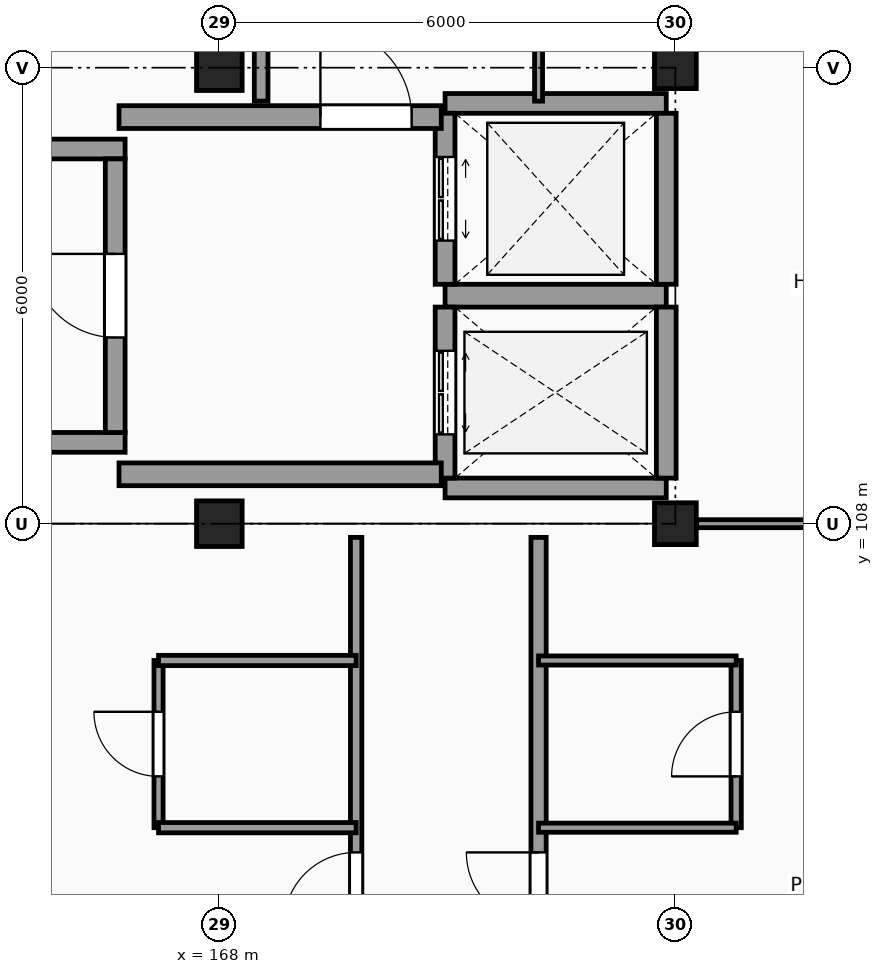
"""IFC4 building model, lengths in metres.
Left out: names, types, materials, properties, quantities, classifications, styles, units other than length and angle.
Written with IfcOpenShell. Run it as: python <this file> out.ifc"""

import sys

from ifc_helpers import new_model, si_unit, direction, frame, frame_2d, origin, origin_2d, place, context, subcontext, project, spatial, rectangle, extrude, element, fill, save


model = new_model("IFC4")
c1 = context("Model", 3, precision=1e-05, world=origin(), true_north=direction((0.0, 1.0)))
c2 = subcontext(c1, "Body", "Model", "MODEL_VIEW")
j1 = project(units=[si_unit("LENGTHUNIT", "METRE"), si_unit("PLANEANGLEUNIT", "RADIAN")], contexts=[c1])
p1 = place(None, origin())
s1 = spatial("IfcSite", under=j1, at=p1, CompositionType="ELEMENT")
p2 = place(p1, origin())
s2 = spatial("IfcBuilding", under=s1, at=p2, CompositionType="ELEMENT")
p3 = place(p2, frame((0.0, 0.0, 31.5)))
s3 = spatial("IfcBuildingStorey", under=s2, at=p3, CompositionType="ELEMENT", Elevation=31.5)
for number, where, z_axis, x_axis in (
    (1, (168.0, 108.0, 0.0), (0.0, 0.0, 1.0), (1.0, 0.0, 0.0)),
    (2, (168.0, 114.0, 0.0), (0.0, 0.0, 1.0), (1.0, 0.0, 0.0)),
):
    element("IfcColumn", number, at=place(p3, frame(where, z_axis=z_axis, x_axis=x_axis)), inside=s3, PredefinedType="COLUMN", context=c2, shape_type="SweptSolid", body=[
        extrude(rectangle(XDim=0.6, YDim=0.6, at=origin_2d()), origin(), (0.0, 0.0, 1.0), 3.3),
    ])
for number, where, z_axis, x_axis in (
    (3, (174.0, 108.0, 0.0), (0.0, 0.0, 1.0), (1.0, 0.0, 0.0)),
    (4, (174.0, 114.0, 0.0), (0.0, 0.0, 1.0), (1.0, 0.0, 0.0)),
):
    element("IfcColumn", number, at=place(p3, frame(where, z_axis=z_axis, x_axis=x_axis)), inside=s3, PredefinedType="COLUMN", context=c2, shape_type="SweptSolid", body=[
        extrude(rectangle(XDim=0.55, YDim=0.55, at=origin_2d()), origin(), (0.0, 0.0, 1.0), 3.3),
    ])
for number, where, z_axis, x_axis in (
    (5, (156.04, 109.07, 0.0), (0.0, 0.0, 1.0), (1.0, 0.0, 0.0)),
    (6, (156.04, 112.93, 0.0), (0.0, 0.0, 1.0), (1.0, 0.0, 0.0)),
):
    element("IfcWall", number, at=place(p3, frame(where, z_axis=z_axis, x_axis=x_axis)), inside=s3, PredefinedType="SHEAR", context=c2, shape_type="SweptSolid", body=[
        extrude(rectangle(XDim=10.72, YDim=0.26, at=frame_2d((5.36, 0.0))), origin(), (0.0, 0.0, 1.0), 3.3),
    ])
p4 = place(p3, frame((166.63, 109.2, 0.0), z_axis=(0.0, 0.0, 1.0), x_axis=(0.0, 1.0, 0.0)))
e7 = element("IfcWall", 7, at=p4, inside=s3, PredefinedType="SHEAR", context=c2, shape_type="SweptSolid", body=[
    extrude(rectangle(XDim=3.6, YDim=0.26, at=frame_2d((1.8, 0.0))), origin(), (0.0, 0.0, 1.0), 3.3),
])
p5 = place(p4, frame((1.25, 0.0, 0.0)))
e8 = element("IfcOpeningElement", 8, at=p5, cuts=e7, PredefinedType="OPENING", context=c2, shape_type="SweptSolid", body=[
    extrude(rectangle(XDim=1.1, YDim=2.15, at=frame_2d((0.55, 1.075))), frame((0.0, 0.14, 0.0), z_axis=(0.0, -1.0, 0.0), x_axis=(1.0, 0.0, 0.0)), (0.0, 0.0, 1.0), 0.28),
])
p6 = place(p3, frame((170.97, 108.47, 0.0), z_axis=(0.0, 0.0, 1.0), x_axis=(1.0, 0.0, 0.0)))
e9 = element("IfcWall", 9, at=p6, inside=s3, PredefinedType="SHEAR", context=c2, shape_type="SweptSolid", body=[
    extrude(rectangle(XDim=2.91, YDim=0.26, at=frame_2d((1.455, 0.0))), origin(), (0.0, 0.0, 1.0), 3.3),
])
p7 = place(p3, frame((170.97, 111.0, 0.0), z_axis=(0.0, 0.0, 1.0), x_axis=(1.0, 0.0, 0.0)))
e10 = element("IfcWall", 10, at=p7, inside=s3, PredefinedType="SHEAR", context=c2, shape_type="SweptSolid", body=[
    extrude(rectangle(XDim=2.91, YDim=0.3, at=frame_2d((1.455, 0.0))), origin(), (0.0, 0.0, 1.0), 3.3),
])
p8 = place(p3, frame((173.88, 108.6, 0.0), z_axis=(0.0, 0.0, 1.0), x_axis=(0.0, 1.0, 0.0)))
e11 = element("IfcWall", 11, at=p8, inside=s3, PredefinedType="SHEAR", context=c2, shape_type="SweptSolid", body=[
    extrude(rectangle(XDim=2.25, YDim=0.26, at=frame_2d((1.125, 0.0))), origin(), (0.0, 0.0, 1.0), 3.3),
])
p9 = place(p3, frame((170.97, 108.6, 0.0), z_axis=(0.0, 0.0, 1.0), x_axis=(0.0, 1.0, 0.0)))
e12 = element("IfcWall", 12, at=p9, inside=s3, PredefinedType="SHEAR", context=c2, shape_type="SweptSolid", body=[
    extrude(rectangle(XDim=2.25, YDim=0.26, at=frame_2d((1.125, 0.0))), origin(), (0.0, 0.0, 1.0), 3.3),
])
p10 = place(p9, frame((0.575, 0.0, 0.0)))
e13 = element("IfcOpeningElement", 13, at=p10, cuts=e12, PredefinedType="OPENING", context=c2, shape_type="SweptSolid", body=[
    extrude(rectangle(XDim=1.1, YDim=2.2, at=frame_2d((0.55, 1.1))), frame((0.0, 0.14, 0.0), z_axis=(0.0, -1.0, 0.0), x_axis=(1.0, 0.0, 0.0)), (0.0, 0.0, 1.0), 0.28),
])
p11 = place(p3, frame((170.97, 113.53, 0.0), z_axis=(0.0, 0.0, 1.0), x_axis=(1.0, 0.0, 0.0)))
e14 = element("IfcWall", 14, at=p11, inside=s3, PredefinedType="SHEAR", context=c2, shape_type="SweptSolid", body=[
    extrude(rectangle(XDim=2.91, YDim=0.26, at=frame_2d((1.455, 0.0))), origin(), (0.0, 0.0, 1.0), 3.3),
])
p12 = place(p3, frame((173.88, 111.15, 0.0), z_axis=(0.0, 0.0, 1.0), x_axis=(0.0, 1.0, 0.0)))
e15 = element("IfcWall", 15, at=p12, inside=s3, PredefinedType="SHEAR", context=c2, shape_type="SweptSolid", body=[
    extrude(rectangle(XDim=2.25, YDim=0.26, at=frame_2d((1.125, 0.0))), origin(), (0.0, 0.0, 1.0), 3.3),
])
p13 = place(p3, frame((170.97, 111.15, 0.0), z_axis=(0.0, 0.0, 1.0), x_axis=(0.0, 1.0, 0.0)))
e16 = element("IfcWall", 16, at=p13, inside=s3, PredefinedType="SHEAR", context=c2, shape_type="SweptSolid", body=[
    extrude(rectangle(XDim=2.25, YDim=0.26, at=frame_2d((1.125, 0.0))), origin(), (0.0, 0.0, 1.0), 3.3),
])
p14 = place(p13, frame((0.575, 0.0, 0.0)))
e17 = element("IfcOpeningElement", 17, at=p14, cuts=e16, PredefinedType="OPENING", context=c2, shape_type="SweptSolid", body=[
    extrude(rectangle(XDim=1.1, YDim=2.2, at=frame_2d((0.55, 1.1))), frame((0.0, 0.14, 0.0), z_axis=(0.0, -1.0, 0.0), x_axis=(1.0, 0.0, 0.0)), (0.0, 0.0, 1.0), 0.28),
])
p15 = place(p3, frame((166.68, 113.35, 0.0), z_axis=(0.0, 0.0, 1.0), x_axis=(1.0, 0.0, 0.0)))
e18 = element("IfcWall", 18, at=p15, inside=s3, PredefinedType="SHEAR", context=c2, shape_type="SweptSolid", body=[
    extrude(rectangle(XDim=4.24, YDim=0.3, at=frame_2d((2.12, 0.0))), origin(), (0.0, 0.0, 1.0), 3.3),
])
p16 = place(p15, frame((2.65, 0.0, 0.0)))
e19 = element("IfcOpeningElement", 19, at=p16, cuts=e18, PredefinedType="OPENING", context=c2, shape_type="SweptSolid", body=[
    extrude(rectangle(XDim=1.2, YDim=2.2, at=frame_2d((0.6, 1.1))), frame((0.0, 0.16, 0.0), z_axis=(0.0, -1.0, 0.0), x_axis=(1.0, 0.0, 0.0)), (0.0, 0.0, 1.0), 0.32),
])
p17 = place(p3, frame((166.68, 108.65, 0.0), z_axis=(0.0, 0.0, 1.0), x_axis=(1.0, 0.0, 0.0)))
e20 = element("IfcWall", 20, at=p17, inside=s3, PredefinedType="SHEAR", context=c2, shape_type="SweptSolid", body=[
    extrude(rectangle(XDim=4.24, YDim=0.3, at=frame_2d((2.12, 0.0))), origin(), (0.0, 0.0, 1.0), 3.3),
])
p18 = place(p3, frame((167.2, 104.0, 0.0), z_axis=(0.0, 0.0, 1.0), x_axis=(0.0, 1.0, 0.0)))
e21 = element("IfcWall", 21, at=p18, inside=s3, PredefinedType="PARTITIONING", context=c2, shape_type="SweptSolid", body=[
    extrude(rectangle(XDim=2.2, YDim=0.12, at=frame_2d((1.1, 0.0))), origin(), (0.0, 0.0, 1.0), 3.07),
])
p19 = place(p18, frame((0.675, 0.0, 0.0)))
e22 = element("IfcOpeningElement", 22, at=p19, cuts=e21, PredefinedType="OPENING", context=c2, shape_type="SweptSolid", body=[
    extrude(rectangle(XDim=0.85, YDim=2.1, at=frame_2d((0.425, 1.05))), frame((0.0, 0.07, 0.0), z_axis=(0.0, -1.0, 0.0), x_axis=(1.0, 0.0, 0.0)), (0.0, 0.0, 1.0), 0.14),
])
p20 = place(p3, frame((168.55, 113.56, 0.0), z_axis=(0.0, 0.0, 1.0), x_axis=(0.0, 1.0, 0.0)))
e23 = element("IfcWall", 23, at=p20, inside=s3, PredefinedType="PARTITIONING", context=c2, shape_type="SweptSolid", body=[
    extrude(rectangle(XDim=2.24, YDim=0.18, at=frame_2d((1.12, 0.0))), origin(), (0.0, 0.0, 1.0), 3.07),
])
p21 = place(p3, frame((169.8, 42.255, 0.0), z_axis=(0.0, 0.0, 1.0), x_axis=(0.0, 1.0, 0.0)))
e24 = element("IfcWall", 24, at=p21, inside=s3, PredefinedType="PARTITIONING", context=c2, shape_type="SweptSolid", body=[
    extrude(rectangle(XDim=65.565, YDim=0.15, at=frame_2d((32.783, 0.0))), origin(), (0.0, 0.0, 1.0), 3.07),
])
p22 = place(p21, frame((50.145, 0.0, 0.0)))
e25 = element("IfcOpeningElement", 25, at=p22, cuts=e24, PredefinedType="OPENING", context=c2, shape_type="SweptSolid", body=[
    extrude(rectangle(XDim=1.2, YDim=2.2, at=frame_2d((0.6, 1.1))), frame((0.0, 0.085, 0.0), z_axis=(0.0, -1.0, 0.0), x_axis=(1.0, 0.0, 0.0)), (0.0, 0.0, 1.0), 0.17),
])
p23 = place(p21, frame((0.42, 0.0, 0.0)))
e26 = element("IfcOpeningElement", 26, at=p23, cuts=e24, PredefinedType="OPENING", context=c2, shape_type="SweptSolid", body=[
    extrude(rectangle(XDim=0.95, YDim=2.1, at=frame_2d((0.475, 1.05))), frame((0.0, 0.085, 0.0), z_axis=(0.0, -1.0, 0.0), x_axis=(1.0, 0.0, 0.0)), (0.0, 0.0, 1.0), 0.17),
])
p24 = place(p21, frame((6.47, 0.0, 0.0)))
e27 = element("IfcOpeningElement", 27, at=p24, cuts=e24, PredefinedType="OPENING", context=c2, shape_type="SweptSolid", body=[
    extrude(rectangle(XDim=0.95, YDim=2.1, at=frame_2d((0.475, 1.05))), frame((0.0, 0.085, 0.0), z_axis=(0.0, -1.0, 0.0), x_axis=(1.0, 0.0, 0.0)), (0.0, 0.0, 1.0), 0.17),
])
p25 = place(p21, frame((12.47, 0.0, 0.0)))
e28 = element("IfcOpeningElement", 28, at=p25, cuts=e24, PredefinedType="OPENING", context=c2, shape_type="SweptSolid", body=[
    extrude(rectangle(XDim=0.95, YDim=2.1, at=frame_2d((0.475, 1.05))), frame((0.0, 0.085, 0.0), z_axis=(0.0, -1.0, 0.0), x_axis=(1.0, 0.0, 0.0)), (0.0, 0.0, 1.0), 0.17),
])
p26 = place(p21, frame((18.47, 0.0, 0.0)))
e29 = element("IfcOpeningElement", 29, at=p26, cuts=e24, PredefinedType="OPENING", context=c2, shape_type="SweptSolid", body=[
    extrude(rectangle(XDim=0.95, YDim=2.1, at=frame_2d((0.475, 1.05))), frame((0.0, 0.085, 0.0), z_axis=(0.0, -1.0, 0.0), x_axis=(1.0, 0.0, 0.0)), (0.0, 0.0, 1.0), 0.17),
])
p27 = place(p21, frame((24.47, 0.0, 0.0)))
e30 = element("IfcOpeningElement", 30, at=p27, cuts=e24, PredefinedType="OPENING", context=c2, shape_type="SweptSolid", body=[
    extrude(rectangle(XDim=0.95, YDim=2.1, at=frame_2d((0.475, 1.05))), frame((0.0, 0.085, 0.0), z_axis=(0.0, -1.0, 0.0), x_axis=(1.0, 0.0, 0.0)), (0.0, 0.0, 1.0), 0.17),
])
p28 = place(p21, frame((30.47, 0.0, 0.0)))
e31 = element("IfcOpeningElement", 31, at=p28, cuts=e24, PredefinedType="OPENING", context=c2, shape_type="SweptSolid", body=[
    extrude(rectangle(XDim=0.95, YDim=2.1, at=frame_2d((0.475, 1.05))), frame((0.0, 0.085, 0.0), z_axis=(0.0, -1.0, 0.0), x_axis=(1.0, 0.0, 0.0)), (0.0, 0.0, 1.0), 0.17),
])
p29 = place(p21, frame((54.47, 0.0, 0.0)))
e32 = element("IfcOpeningElement", 32, at=p29, cuts=e24, PredefinedType="OPENING", context=c2, shape_type="SweptSolid", body=[
    extrude(rectangle(XDim=0.95, YDim=2.1, at=frame_2d((0.475, 1.05))), frame((0.0, 0.085, 0.0), z_axis=(0.0, -1.0, 0.0), x_axis=(1.0, 0.0, 0.0)), (0.0, 0.0, 1.0), 0.17),
])
p30 = place(p21, frame((60.47, 0.0, 0.0)))
e33 = element("IfcOpeningElement", 33, at=p30, cuts=e24, PredefinedType="OPENING", context=c2, shape_type="SweptSolid", body=[
    extrude(rectangle(XDim=0.95, YDim=2.1, at=frame_2d((0.475, 1.05))), frame((0.0, 0.085, 0.0), z_axis=(0.0, -1.0, 0.0), x_axis=(1.0, 0.0, 0.0)), (0.0, 0.0, 1.0), 0.17),
])
p31 = place(p3, frame((172.2, 42.255, 0.0), z_axis=(0.0, 0.0, 1.0), x_axis=(0.0, 1.0, 0.0)))
e34 = element("IfcWall", 34, at=p31, inside=s3, PredefinedType="PARTITIONING", context=c2, shape_type="SweptSolid", body=[
    extrude(rectangle(XDim=65.565, YDim=0.2, at=frame_2d((32.783, 0.0))), origin(), (0.0, 0.0, 1.0), 3.07),
])
p32 = place(p31, frame((0.42, 0.0, 0.0)))
e35 = element("IfcOpeningElement", 35, at=p32, cuts=e34, PredefinedType="OPENING", context=c2, shape_type="SweptSolid", body=[
    extrude(rectangle(XDim=0.95, YDim=2.1, at=frame_2d((0.475, 1.05))), frame((0.0, 0.11, 0.0), z_axis=(0.0, -1.0, 0.0), x_axis=(1.0, 0.0, 0.0)), (0.0, 0.0, 1.0), 0.22),
])
p33 = place(p31, frame((6.47, 0.0, 0.0)))
e36 = element("IfcOpeningElement", 36, at=p33, cuts=e34, PredefinedType="OPENING", context=c2, shape_type="SweptSolid", body=[
    extrude(rectangle(XDim=0.95, YDim=2.1, at=frame_2d((0.475, 1.05))), frame((0.0, 0.11, 0.0), z_axis=(0.0, -1.0, 0.0), x_axis=(1.0, 0.0, 0.0)), (0.0, 0.0, 1.0), 0.22),
])
p34 = place(p31, frame((16.27, 0.0, 0.0)))
e37 = element("IfcOpeningElement", 37, at=p34, cuts=e34, PredefinedType="OPENING", context=c2, shape_type="SweptSolid", body=[
    extrude(rectangle(XDim=0.95, YDim=2.1, at=frame_2d((0.475, 1.05))), frame((0.0, 0.11, 0.0), z_axis=(0.0, -1.0, 0.0), x_axis=(1.0, 0.0, 0.0)), (0.0, 0.0, 1.0), 0.22),
])
p35 = place(p31, frame((18.47, 0.0, 0.0)))
e38 = element("IfcOpeningElement", 38, at=p35, cuts=e34, PredefinedType="OPENING", context=c2, shape_type="SweptSolid", body=[
    extrude(rectangle(XDim=0.95, YDim=2.1, at=frame_2d((0.475, 1.05))), frame((0.0, 0.11, 0.0), z_axis=(0.0, -1.0, 0.0), x_axis=(1.0, 0.0, 0.0)), (0.0, 0.0, 1.0), 0.22),
])
p36 = place(p31, frame((22.87, 0.0, 0.0)))
e39 = element("IfcOpeningElement", 39, at=p36, cuts=e34, PredefinedType="OPENING", context=c2, shape_type="SweptSolid", body=[
    extrude(rectangle(XDim=0.95, YDim=2.1, at=frame_2d((0.475, 1.05))), frame((0.0, 0.11, 0.0), z_axis=(0.0, -1.0, 0.0), x_axis=(1.0, 0.0, 0.0)), (0.0, 0.0, 1.0), 0.22),
])
p37 = place(p31, frame((27.37, 0.0, 0.0)))
e40 = element("IfcOpeningElement", 40, at=p37, cuts=e34, PredefinedType="OPENING", context=c2, shape_type="SweptSolid", body=[
    extrude(rectangle(XDim=0.95, YDim=2.1, at=frame_2d((0.475, 1.05))), frame((0.0, 0.11, 0.0), z_axis=(0.0, -1.0, 0.0), x_axis=(1.0, 0.0, 0.0)), (0.0, 0.0, 1.0), 0.22),
])
p38 = place(p31, frame((36.47, 0.0, 0.0)))
e41 = element("IfcOpeningElement", 41, at=p38, cuts=e34, PredefinedType="OPENING", context=c2, shape_type="SweptSolid", body=[
    extrude(rectangle(XDim=0.95, YDim=2.1, at=frame_2d((0.475, 1.05))), frame((0.0, 0.11, 0.0), z_axis=(0.0, -1.0, 0.0), x_axis=(1.0, 0.0, 0.0)), (0.0, 0.0, 1.0), 0.22),
])
p39 = place(p31, frame((40.87, 0.0, 0.0)))
e42 = element("IfcOpeningElement", 42, at=p39, cuts=e34, PredefinedType="OPENING", context=c2, shape_type="SweptSolid", body=[
    extrude(rectangle(XDim=0.95, YDim=2.1, at=frame_2d((0.475, 1.05))), frame((0.0, 0.11, 0.0), z_axis=(0.0, -1.0, 0.0), x_axis=(1.0, 0.0, 0.0)), (0.0, 0.0, 1.0), 0.22),
])
p40 = place(p31, frame((48.07, 0.0, 0.0)))
e43 = element("IfcOpeningElement", 43, at=p40, cuts=e34, PredefinedType="OPENING", context=c2, shape_type="SweptSolid", body=[
    extrude(rectangle(XDim=0.95, YDim=2.1, at=frame_2d((0.475, 1.05))), frame((0.0, 0.11, 0.0), z_axis=(0.0, -1.0, 0.0), x_axis=(1.0, 0.0, 0.0)), (0.0, 0.0, 1.0), 0.22),
])
p41 = place(p31, frame((56.32, 0.0, 0.0)))
e44 = element("IfcOpeningElement", 44, at=p41, cuts=e34, PredefinedType="OPENING", context=c2, shape_type="SweptSolid", body=[
    extrude(rectangle(XDim=0.95, YDim=2.1, at=frame_2d((0.475, 1.05))), frame((0.0, 0.11, 0.0), z_axis=(0.0, -1.0, 0.0), x_axis=(1.0, 0.0, 0.0)), (0.0, 0.0, 1.0), 0.22),
])
p42 = place(p31, frame((60.47, 0.0, 0.0)))
e45 = element("IfcOpeningElement", 45, at=p42, cuts=e34, PredefinedType="OPENING", context=c2, shape_type="SweptSolid", body=[
    extrude(rectangle(XDim=0.95, YDim=2.1, at=frame_2d((0.475, 1.05))), frame((0.0, 0.11, 0.0), z_axis=(0.0, -1.0, 0.0), x_axis=(1.0, 0.0, 0.0)), (0.0, 0.0, 1.0), 0.22),
])
p43 = place(p3, frame((172.2, 113.56, 0.0), z_axis=(0.0, 0.0, 1.0), x_axis=(0.0, 1.0, 0.0)))
e46 = element("IfcWall", 46, at=p43, inside=s3, PredefinedType="PARTITIONING", context=c2, shape_type="SweptSolid", body=[
    extrude(rectangle(XDim=2.24, YDim=0.105, at=frame_2d((1.12, 0.0))), origin(), (0.0, 0.0, 1.0), 3.07),
])
p44 = place(p3, frame((174.8, 104.0, 0.0), z_axis=(0.0, 0.0, 1.0), x_axis=(0.0, 1.0, 0.0)))
e47 = element("IfcWall", 47, at=p44, inside=s3, PredefinedType="PARTITIONING", context=c2, shape_type="SweptSolid", body=[
    extrude(rectangle(XDim=2.2, YDim=0.135, at=frame_2d((1.1, 0.0))), origin(), (0.0, 0.0, 1.0), 3.07),
])
p45 = place(p44, frame((0.675, 0.0, 0.0)))
e48 = element("IfcOpeningElement", 48, at=p45, cuts=e47, PredefinedType="OPENING", context=c2, shape_type="SweptSolid", body=[
    extrude(rectangle(XDim=0.85, YDim=2.1, at=frame_2d((0.425, 1.05))), frame((0.0, 0.078, 0.0), z_axis=(0.0, -1.0, 0.0), x_axis=(1.0, 0.0, 0.0)), (0.0, 0.0, 1.0), 0.155),
])
p46 = place(p3, frame((167.2, 104.0, 0.0), z_axis=(0.0, 0.0, 1.0), x_axis=(1.0, 0.0, 0.0)))
e49 = element("IfcWall", 49, at=p46, inside=s3, PredefinedType="PARTITIONING", context=c2, shape_type="SweptSolid", body=[
    extrude(rectangle(XDim=2.6, YDim=0.135, at=frame_2d((1.3, 0.0))), origin(), (0.0, 0.0, 1.0), 3.07),
])
p47 = place(p3, frame((172.2, 104.0, 0.0), z_axis=(0.0, 0.0, 1.0), x_axis=(1.0, 0.0, 0.0)))
e50 = element("IfcWall", 50, at=p47, inside=s3, PredefinedType="PARTITIONING", context=c2, shape_type="SweptSolid", body=[
    extrude(rectangle(XDim=2.6, YDim=0.12, at=frame_2d((1.3, 0.0))), origin(), (0.0, 0.0, 1.0), 3.07),
])
p48 = place(p3, frame((167.2, 106.2, 0.0), z_axis=(0.0, 0.0, 1.0), x_axis=(1.0, 0.0, 0.0)))
e51 = element("IfcWall", 51, at=p48, inside=s3, PredefinedType="PARTITIONING", context=c2, shape_type="SweptSolid", body=[
    extrude(rectangle(XDim=2.6, YDim=0.135, at=frame_2d((1.3, 0.0))), origin(), (0.0, 0.0, 1.0), 3.07),
])
p49 = place(p3, frame((172.2, 106.2, 0.0), z_axis=(0.0, 0.0, 1.0), x_axis=(1.0, 0.0, 0.0)))
e52 = element("IfcWall", 52, at=p49, inside=s3, PredefinedType="PARTITIONING", context=c2, shape_type="SweptSolid", body=[
    extrude(rectangle(XDim=2.6, YDim=0.12, at=frame_2d((1.3, 0.0))), origin(), (0.0, 0.0, 1.0), 3.07),
])
p50 = place(p3, frame((174.28, 108.0, 0.0), z_axis=(0.0, 0.0, 1.0), x_axis=(1.0, 0.0, 0.0)))
e53 = element("IfcWall", 53, at=p50, inside=s3, PredefinedType="PARTITIONING", context=c2, shape_type="SweptSolid", body=[
    extrude(rectangle(XDim=5.415, YDim=0.105, at=frame_2d((2.708, 0.0))), origin(), (0.0, 0.0, 1.0), 2.47),
])
p51 = place(p5, origin())
e54 = element("IfcDoor", 54, at=p51, inside=s3, OperationType="SINGLE_SWING_RIGHT", PredefinedType="DOOR", context=c2, shape_type="SweptSolid", body=[
    extrude(rectangle(XDim=1.1, YDim=2.15, at=frame_2d((0.55, 1.075))), frame((0.0, 0.025, 0.0), z_axis=(0.0, -1.0, 0.0), x_axis=(1.0, 0.0, 0.0)), (0.0, 0.0, 1.0), 0.05),
])
fill(e8, e54)
p52 = place(p10, origin())
e55 = element("IfcDoor", 55, at=p52, inside=s3, OperationType="DOUBLE_DOOR_SLIDING", PredefinedType="DOOR", context=c2, shape_type="SweptSolid", body=[
    extrude(rectangle(XDim=1.1, YDim=2.2, at=frame_2d((0.55, 1.1))), frame((0.0, 0.025, 0.0), z_axis=(0.0, -1.0, 0.0), x_axis=(1.0, 0.0, 0.0)), (0.0, 0.0, 1.0), 0.05),
])
fill(e13, e55)
p53 = place(p14, origin())
e56 = element("IfcDoor", 56, at=p53, inside=s3, OperationType="DOUBLE_DOOR_SLIDING", PredefinedType="DOOR", context=c2, shape_type="SweptSolid", body=[
    extrude(rectangle(XDim=1.1, YDim=2.2, at=frame_2d((0.55, 1.1))), frame((0.0, 0.025, 0.0), z_axis=(0.0, -1.0, 0.0), x_axis=(1.0, 0.0, 0.0)), (0.0, 0.0, 1.0), 0.05),
])
fill(e17, e56)
p54 = place(p16, origin())
e57 = element("IfcDoor", 57, at=p54, inside=s3, OperationType="SINGLE_SWING_LEFT", PredefinedType="DOOR", context=c2, shape_type="SweptSolid", body=[
    extrude(rectangle(XDim=1.2, YDim=2.2, at=frame_2d((0.6, 1.1))), frame((0.0, 0.025, 0.0), z_axis=(0.0, -1.0, 0.0), x_axis=(1.0, 0.0, 0.0)), (0.0, 0.0, 1.0), 0.05),
])
fill(e19, e57)
p55 = place(p45, origin())
e58 = element("IfcDoor", 58, at=p55, inside=s3, OperationType="SINGLE_SWING_LEFT", PredefinedType="DOOR", context=c2, shape_type="SweptSolid", body=[
    extrude(rectangle(XDim=0.85, YDim=2.1, at=frame_2d((0.425, 1.05))), frame((0.0, 0.025, 0.0), z_axis=(0.0, -1.0, 0.0), x_axis=(1.0, 0.0, 0.0)), (0.0, 0.0, 1.0), 0.05),
])
fill(e48, e58)
p56 = place(p42, origin())
e59 = element("IfcDoor", 59, at=p56, inside=s3, OperationType="SINGLE_SWING_RIGHT", PredefinedType="DOOR", context=c2, shape_type="SweptSolid", body=[
    extrude(rectangle(XDim=0.95, YDim=2.1, at=frame_2d((0.475, 1.05))), frame((0.0, 0.025, 0.0), z_axis=(0.0, -1.0, 0.0), x_axis=(1.0, 0.0, 0.0)), (0.0, 0.0, 1.0), 0.05),
])
fill(e45, e59)
p57 = place(p19, origin())
e60 = element("IfcDoor", 60, at=p57, inside=s3, OperationType="SINGLE_SWING_RIGHT", PredefinedType="DOOR", context=c2, shape_type="SweptSolid", body=[
    extrude(rectangle(XDim=0.85, YDim=2.1, at=frame_2d((0.425, 1.05))), frame((0.0, 0.025, 0.0), z_axis=(0.0, -1.0, 0.0), x_axis=(1.0, 0.0, 0.0)), (0.0, 0.0, 1.0), 0.05),
])
fill(e22, e60)
p58 = place(p30, origin())
e61 = element("IfcDoor", 61, at=p58, inside=s3, OperationType="SINGLE_SWING_LEFT", PredefinedType="DOOR", context=c2, shape_type="SweptSolid", body=[
    extrude(rectangle(XDim=0.95, YDim=2.1, at=frame_2d((0.475, 1.05))), frame((0.0, 0.025, 0.0), z_axis=(0.0, -1.0, 0.0), x_axis=(1.0, 0.0, 0.0)), (0.0, 0.0, 1.0), 0.05),
])
fill(e33, e61)
save(model, sys.argv[1])
